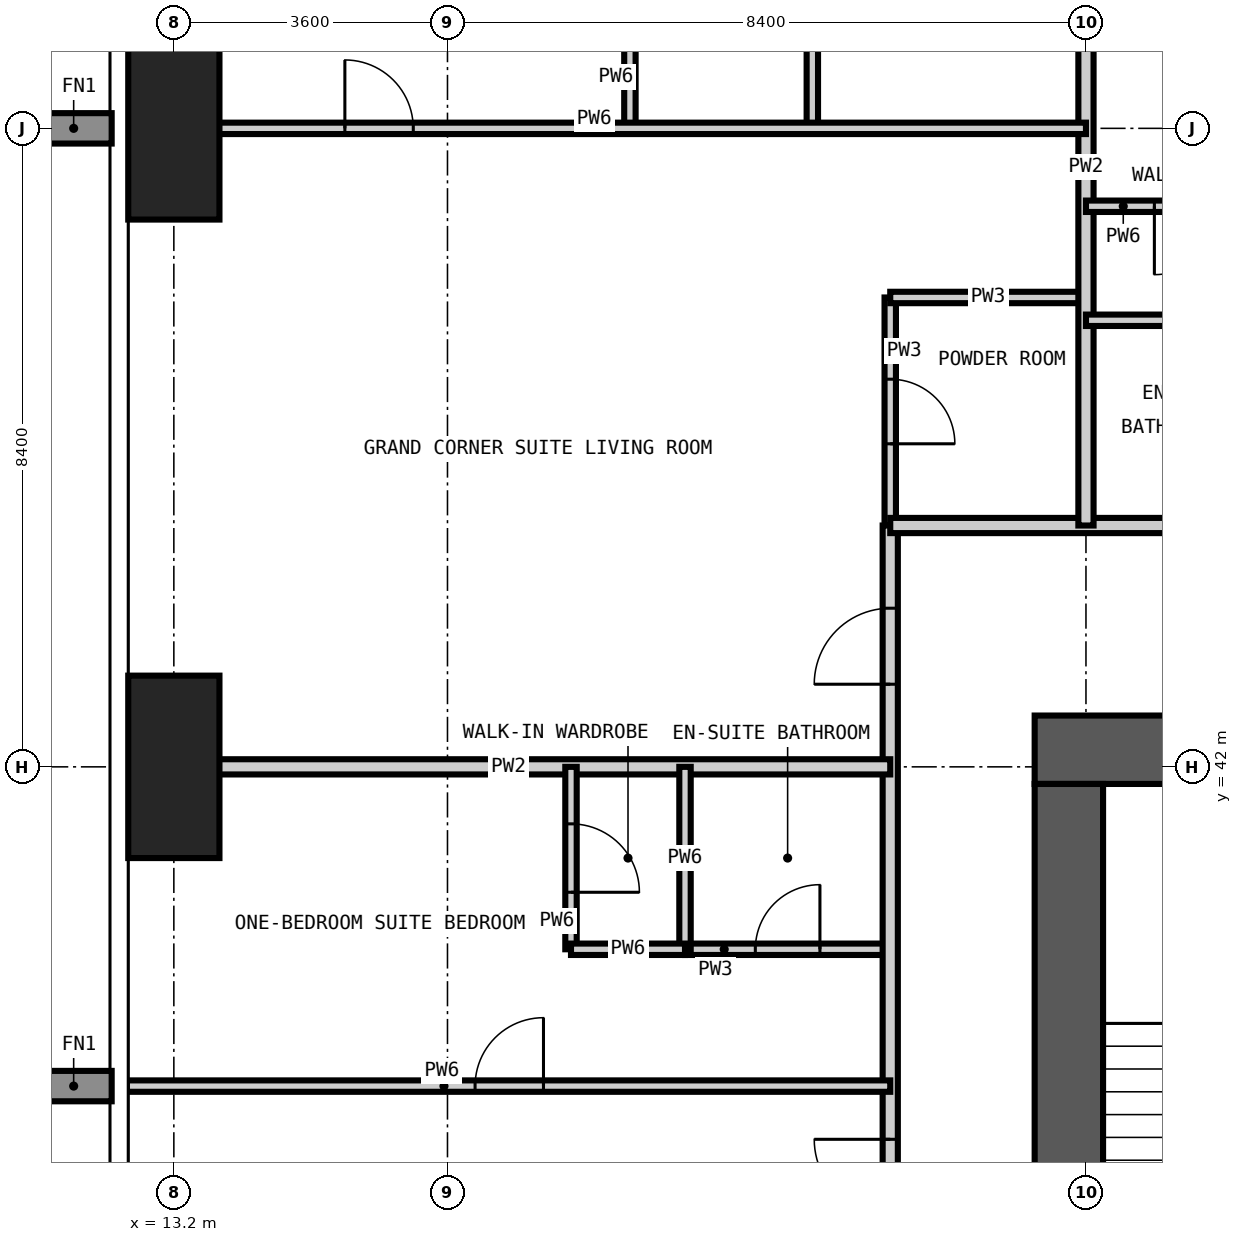
"""IFC4 building model, lengths in metres.
Left out: names, types, materials, properties, quantities, classifications, styles, units other than length and angle.
Written with IfcOpenShell. Run it as: python <this file> out.ifc"""

import sys

from ifc_helpers import new_model, si_unit, direction, frame, frame_2d, origin, origin_2d, place, context, subcontext, project, spatial, rectangle, extrude, element, fill, save


model = new_model("IFC4")
c1 = context("Model", 3, precision=1e-05, world=origin(), true_north=direction((0.0, 1.0)))
c2 = subcontext(c1, "Body", "Model", "MODEL_VIEW")
j1 = project(units=[si_unit("LENGTHUNIT", "METRE"), si_unit("PLANEANGLEUNIT", "RADIAN")], contexts=[c1])
p1 = place(None, origin())
s1 = spatial("IfcSite", under=j1, at=p1, CompositionType="ELEMENT")
p2 = place(p1, origin())
s2 = spatial("IfcBuilding", under=s1, at=p2, CompositionType="ELEMENT")
p3 = place(p2, frame((0.0, 0.0, 233.4)))
s3 = spatial("IfcBuildingStorey", under=s2, at=p3, CompositionType="ELEMENT", Elevation=233.4)
for number, where, z_axis, x_axis in (
    (1, (13.2, 42.0, -0.35), (0.0, 0.0, 1.0), (1.0, 0.0, 0.0)),
    (2, (13.2, 50.4, -0.35), (0.0, 0.0, 1.0), (1.0, 0.0, 0.0)),
):
    element("IfcColumn", number, at=place(p3, frame(where, z_axis=z_axis, x_axis=x_axis)), inside=s3, PredefinedType="COLUMN", context=c2, shape_type="SweptSolid", body=[
        extrude(rectangle(XDim=1.2, YDim=2.4, at=origin_2d()), origin(), (0.0, 0.0, 1.0), 3.9),
    ])
p4 = place(p3, frame((42.675, 42.225, -0.35), z_axis=(0.0, 0.0, 1.0), x_axis=(-1.0, 0.0, 0.0)))
e3 = element("IfcWall", 3, at=p4, inside=s3, PredefinedType="SHEAR", context=c2, shape_type="SweptSolid", body=[
    extrude(rectangle(XDim=18.15, YDim=0.9, at=frame_2d((9.075, 0.0))), origin(), (0.0, 0.0, 1.0), 3.9),
])
p5 = place(p4, frame((10.575, 0.0, 0.35)))
e4 = element("IfcOpeningElement", 4, at=p5, cuts=e3, PredefinedType="OPENING", context=c2, shape_type="SweptSolid", body=[
    extrude(rectangle(XDim=1.2, YDim=2.2, at=frame_2d((0.6, 1.1))), frame((0.0, 0.46, 0.0), z_axis=(0.0, -1.0, 0.0), x_axis=(1.0, 0.0, 0.0)), (0.0, 0.0, 1.0), 0.92),
])
p6 = place(p3, frame((24.975, 41.775, -0.35), z_axis=(0.0, 0.0, 1.0), x_axis=(0.0, -1.0, 0.0)))
e5 = element("IfcWall", 5, at=p6, inside=s3, PredefinedType="SHEAR", context=c2, shape_type="SweptSolid", body=[
    extrude(rectangle(XDim=24.75, YDim=0.9, at=frame_2d((12.375, 0.0))), origin(), (0.0, 0.0, 1.0), 3.9),
])
p7 = place(p6, frame((11.875, 0.0, 0.35)))
e6 = element("IfcOpeningElement", 6, at=p7, cuts=e5, PredefinedType="OPENING", context=c2, shape_type="SweptSolid", body=[
    extrude(rectangle(XDim=1.0, YDim=2.1, at=frame_2d((0.5, 1.05))), frame((0.0, 0.46, 0.0), z_axis=(0.0, -1.0, 0.0), x_axis=(1.0, 0.0, 0.0)), (0.0, 0.0, 1.0), 0.92),
])
p8 = place(p3, frame((22.625, 45.175, 0.0), z_axis=(0.0, 0.0, 1.0), x_axis=(0.0, 1.0, 0.0)))
e7 = element("IfcWall", 7, at=p8, inside=s3, PredefinedType="PARTITIONING", context=c2, shape_type="SweptSolid", body=[
    extrude(rectangle(XDim=3.0, YDim=0.15, at=frame_2d((1.5, 0.0))), origin(), (0.0, 0.0, 1.0), 3.55),
])
p9 = place(p8, frame((1.075, 0.0, 0.0)))
e8 = element("IfcOpeningElement", 8, at=p9, cuts=e7, PredefinedType="OPENING", context=c2, shape_type="SweptSolid", body=[
    extrude(rectangle(XDim=0.85, YDim=2.1, at=frame_2d((0.425, 1.05))), frame((0.0, 0.085, 0.0), z_axis=(0.0, -1.0, 0.0), x_axis=(1.0, 0.0, 0.0)), (0.0, 0.0, 1.0), 0.17),
])
p10 = place(p3, frame((19.925, 39.6, 0.0), z_axis=(0.0, 0.0, 1.0), x_axis=(1.0, 0.0, 0.0)))
e9 = element("IfcWall", 9, at=p10, inside=s3, PredefinedType="PARTITIONING", context=c2, shape_type="SweptSolid", body=[
    extrude(rectangle(XDim=2.7, YDim=0.15, at=frame_2d((1.35, 0.0))), origin(), (0.0, 0.0, 1.0), 3.55),
])
p11 = place(p10, frame((0.925, 0.0, 0.0)))
e10 = element("IfcOpeningElement", 10, at=p11, cuts=e9, PredefinedType="OPENING", context=c2, shape_type="SweptSolid", body=[
    extrude(rectangle(XDim=0.85, YDim=2.1, at=frame_2d((0.425, 1.05))), frame((0.0, 0.085, 0.0), z_axis=(0.0, -1.0, 0.0), x_axis=(1.0, 0.0, 0.0)), (0.0, 0.0, 1.0), 0.17),
])
p12 = place(p3, frame((22.625, 48.175, 0.0), z_axis=(0.0, 0.0, 1.0), x_axis=(1.0, 0.0, 0.0)))
e11 = element("IfcWall", 11, at=p12, inside=s3, PredefinedType="PARTITIONING", context=c2, shape_type="SweptSolid", body=[
    extrude(rectangle(XDim=2.575, YDim=0.15, at=frame_2d((1.288, 0.0))), origin(), (0.0, 0.0, 1.0), 3.55),
])
p13 = place(p3, frame((22.625, 14.225, 0.0), z_axis=(0.0, 0.0, 1.0), x_axis=(0.0, 1.0, 0.0)))
e12 = element("IfcWall", 12, at=p13, inside=s3, PredefinedType="PARTITIONING", context=c2, shape_type="SweptSolid", body=[
    extrude(rectangle(XDim=30.95, YDim=0.2, at=frame_2d((15.475, 0.0))), origin(), (0.0, 0.0, 1.0), 3.55),
])
p14 = place(p13, frame((5.075, 0.0, 0.0)))
e13 = element("IfcOpeningElement", 13, at=p14, cuts=e12, PredefinedType="OPENING", context=c2, shape_type="SweptSolid", body=[
    extrude(rectangle(XDim=1.0, YDim=2.2, at=frame_2d((0.5, 1.1))), frame((0.0, 0.11, 0.0), z_axis=(0.0, -1.0, 0.0), x_axis=(1.0, 0.0, 0.0)), (0.0, 0.0, 1.0), 0.22),
])
p15 = place(p13, frame((13.475, 0.0, 0.0)))
e14 = element("IfcOpeningElement", 14, at=p15, cuts=e12, PredefinedType="OPENING", context=c2, shape_type="SweptSolid", body=[
    extrude(rectangle(XDim=1.0, YDim=2.2, at=frame_2d((0.5, 1.1))), frame((0.0, 0.11, 0.0), z_axis=(0.0, -1.0, 0.0), x_axis=(1.0, 0.0, 0.0)), (0.0, 0.0, 1.0), 0.22),
])
p16 = place(p13, frame((21.875, 0.0, 0.0)))
e15 = element("IfcOpeningElement", 15, at=p16, cuts=e12, PredefinedType="OPENING", context=c2, shape_type="SweptSolid", body=[
    extrude(rectangle(XDim=1.0, YDim=2.2, at=frame_2d((0.5, 1.1))), frame((0.0, 0.11, 0.0), z_axis=(0.0, -1.0, 0.0), x_axis=(1.0, 0.0, 0.0)), (0.0, 0.0, 1.0), 0.22),
])
p17 = place(p13, frame((0.787, 0.0, 0.0)))
e16 = element("IfcOpeningElement", 16, at=p17, cuts=e12, PredefinedType="OPENING", context=c2, shape_type="SweptSolid", body=[
    extrude(rectangle(XDim=1.0, YDim=2.2, at=frame_2d((0.5, 1.1))), frame((0.0, 0.11, 0.0), z_axis=(0.0, -1.0, 0.0), x_axis=(1.0, 0.0, 0.0)), (0.0, 0.0, 1.0), 0.22),
])
p18 = place(p13, frame((28.862, 0.0, 0.0)))
e17 = element("IfcOpeningElement", 17, at=p18, cuts=e12, PredefinedType="OPENING", context=c2, shape_type="SweptSolid", body=[
    extrude(rectangle(XDim=1.0, YDim=2.2, at=frame_2d((0.5, 1.1))), frame((0.0, 0.11, 0.0), z_axis=(0.0, -1.0, 0.0), x_axis=(1.0, 0.0, 0.0)), (0.0, 0.0, 1.0), 0.22),
])
p19 = place(p3, frame((22.625, 45.175, 0.0), z_axis=(0.0, 0.0, 1.0), x_axis=(1.0, 0.0, 0.0)))
e18 = element("IfcWall", 18, at=p19, inside=s3, PredefinedType="PARTITIONING", context=c2, shape_type="SweptSolid", body=[
    extrude(rectangle(XDim=22.25, YDim=0.2, at=frame_2d((11.125, 0.0))), origin(), (0.0, 0.0, 1.0), 3.55),
])
p20 = place(p19, frame((7.625, 0.0, 0.0)))
e19 = element("IfcOpeningElement", 19, at=p20, cuts=e18, PredefinedType="OPENING", context=c2, shape_type="SweptSolid", body=[
    extrude(rectangle(XDim=1.0, YDim=2.2, at=frame_2d((0.5, 1.1))), frame((0.0, 0.11, 0.0), z_axis=(0.0, -1.0, 0.0), x_axis=(1.0, 0.0, 0.0)), (0.0, 0.0, 1.0), 0.22),
])
p21 = place(p19, frame((16.025, 0.0, 0.0)))
e20 = element("IfcOpeningElement", 20, at=p21, cuts=e18, PredefinedType="OPENING", context=c2, shape_type="SweptSolid", body=[
    extrude(rectangle(XDim=1.0, YDim=2.2, at=frame_2d((0.5, 1.1))), frame((0.0, 0.11, 0.0), z_axis=(0.0, -1.0, 0.0), x_axis=(1.0, 0.0, 0.0)), (0.0, 0.0, 1.0), 0.22),
])
p22 = place(p3, frame((25.2, 45.175, 0.0), z_axis=(0.0, 0.0, 1.0), x_axis=(0.0, 1.0, 0.0)))
e21 = element("IfcWall", 21, at=p22, inside=s3, PredefinedType="PARTITIONING", context=c2, shape_type="SweptSolid", body=[
    extrude(rectangle(XDim=9.443, YDim=0.2, at=frame_2d((4.721, 0.0))), origin(), (0.0, 0.0, 1.0), 3.55),
])
p23 = place(p3, frame((12.582, 42.0, 0.0), z_axis=(0.0, 0.0, 1.0), x_axis=(1.0, 0.0, 0.0)))
e22 = element("IfcWall", 22, at=p23, inside=s3, PredefinedType="PARTITIONING", context=c2, shape_type="SweptSolid", body=[
    extrude(rectangle(XDim=10.043, YDim=0.2, at=frame_2d((5.021, 0.0))), origin(), (0.0, 0.0, 1.0), 3.55),
])
p24 = place(p3, frame((18.425, 39.6, 0.0), z_axis=(0.0, 0.0, 1.0), x_axis=(0.0, 1.0, 0.0)))
e23 = element("IfcWall", 23, at=p24, inside=s3, PredefinedType="PARTITIONING", context=c2, shape_type="SweptSolid", body=[
    extrude(rectangle(XDim=2.4, YDim=0.15, at=frame_2d((1.2, 0.0))), origin(), (0.0, 0.0, 1.0), 3.55),
])
p25 = place(p24, frame((0.75, 0.0, 0.0)))
e24 = element("IfcOpeningElement", 24, at=p25, cuts=e23, PredefinedType="OPENING", context=c2, shape_type="SweptSolid", body=[
    extrude(rectangle(XDim=0.9, YDim=2.1, at=frame_2d((0.45, 1.05))), frame((0.0, 0.085, 0.0), z_axis=(0.0, -1.0, 0.0), x_axis=(1.0, 0.0, 0.0)), (0.0, 0.0, 1.0), 0.17),
])
p26 = place(p3, frame((19.2, 50.4, 0.0), z_axis=(0.0, 0.0, 1.0), x_axis=(0.0, 1.0, 0.0)))
e25 = element("IfcWall", 25, at=p26, inside=s3, PredefinedType="PARTITIONING", context=c2, shape_type="SweptSolid", body=[
    extrude(rectangle(XDim=3.0, YDim=0.15, at=frame_2d((1.5, 0.0))), origin(), (0.0, 0.0, 1.0), 3.55),
])
p27 = place(p26, frame((1.05, 0.0, 0.0)))
e26 = element("IfcOpeningElement", 26, at=p27, cuts=e25, PredefinedType="OPENING", context=c2, shape_type="SweptSolid", body=[
    extrude(rectangle(XDim=0.9, YDim=2.1, at=frame_2d((0.45, 1.05))), frame((0.0, 0.085, 0.0), z_axis=(0.0, -1.0, 0.0), x_axis=(1.0, 0.0, 0.0)), (0.0, 0.0, 1.0), 0.17),
])
p28 = place(p3, frame((19.925, 39.6, 0.0), z_axis=(0.0, 0.0, 1.0), x_axis=(0.0, 1.0, 0.0)))
e27 = element("IfcWall", 27, at=p28, inside=s3, PredefinedType="PARTITIONING", context=c2, shape_type="SweptSolid", body=[
    extrude(rectangle(XDim=2.4, YDim=0.15, at=frame_2d((1.2, 0.0))), origin(), (0.0, 0.0, 1.0), 3.55),
])
p29 = place(p3, frame((21.6, 50.4, 0.0), z_axis=(0.0, 0.0, 1.0), x_axis=(0.0, 1.0, 0.0)))
e28 = element("IfcWall", 28, at=p29, inside=s3, PredefinedType="PARTITIONING", context=c2, shape_type="SweptSolid", body=[
    extrude(rectangle(XDim=3.0, YDim=0.15, at=frame_2d((1.5, 0.0))), origin(), (0.0, 0.0, 1.0), 3.55),
])
p30 = place(p3, frame((12.582, 37.8, 0.0), z_axis=(0.0, 0.0, 1.0), x_axis=(1.0, 0.0, 0.0)))
e29 = element("IfcWall", 29, at=p30, inside=s3, PredefinedType="PARTITIONING", context=c2, shape_type="SweptSolid", body=[
    extrude(rectangle(XDim=10.043, YDim=0.15, at=frame_2d((5.021, 0.0))), origin(), (0.0, 0.0, 1.0), 3.55),
])
p31 = place(p30, frame((4.581, 0.0, 0.0)))
e30 = element("IfcOpeningElement", 30, at=p31, cuts=e29, PredefinedType="OPENING", context=c2, shape_type="SweptSolid", body=[
    extrude(rectangle(XDim=0.9, YDim=2.1, at=frame_2d((0.45, 1.05))), frame((0.0, 0.085, 0.0), z_axis=(0.0, -1.0, 0.0), x_axis=(1.0, 0.0, 0.0)), (0.0, 0.0, 1.0), 0.17),
])
p32 = place(p3, frame((18.425, 39.6, 0.0), z_axis=(0.0, 0.0, 1.0), x_axis=(1.0, 0.0, 0.0)))
e31 = element("IfcWall", 31, at=p32, inside=s3, PredefinedType="PARTITIONING", context=c2, shape_type="SweptSolid", body=[
    extrude(rectangle(XDim=1.5, YDim=0.15, at=frame_2d((0.75, 0.0))), origin(), (0.0, 0.0, 1.0), 3.55),
])
p33 = place(p3, frame((25.2, 47.875, 0.0), z_axis=(0.0, 0.0, 1.0), x_axis=(1.0, 0.0, 0.0)))
e32 = element("IfcWall", 32, at=p33, inside=s3, PredefinedType="PARTITIONING", context=c2, shape_type="SweptSolid", body=[
    extrude(rectangle(XDim=2.7, YDim=0.15, at=frame_2d((1.35, 0.0))), origin(), (0.0, 0.0, 1.0), 3.55),
])
p34 = place(p3, frame((25.2, 49.375, 0.0), z_axis=(0.0, 0.0, 1.0), x_axis=(1.0, 0.0, 0.0)))
e33 = element("IfcWall", 33, at=p34, inside=s3, PredefinedType="PARTITIONING", context=c2, shape_type="SweptSolid", body=[
    extrude(rectangle(XDim=2.7, YDim=0.15, at=frame_2d((1.35, 0.0))), origin(), (0.0, 0.0, 1.0), 3.55),
])
p35 = place(p34, frame((0.9, 0.0, 0.0)))
e34 = element("IfcOpeningElement", 34, at=p35, cuts=e33, PredefinedType="OPENING", context=c2, shape_type="SweptSolid", body=[
    extrude(rectangle(XDim=0.9, YDim=2.1, at=frame_2d((0.45, 1.05))), frame((0.0, 0.085, 0.0), z_axis=(0.0, -1.0, 0.0), x_axis=(1.0, 0.0, 0.0)), (0.0, 0.0, 1.0), 0.17),
])
p36 = place(p3, frame((12.582, 50.4, 0.0), z_axis=(0.0, 0.0, 1.0), x_axis=(1.0, 0.0, 0.0)))
e35 = element("IfcWall", 35, at=p36, inside=s3, PredefinedType="PARTITIONING", context=c2, shape_type="SweptSolid", body=[
    extrude(rectangle(XDim=12.618, YDim=0.15, at=frame_2d((6.309, 0.0))), origin(), (0.0, 0.0, 1.0), 3.55),
])
p37 = place(p36, frame((2.868, 0.0, 0.0)))
e36 = element("IfcOpeningElement", 36, at=p37, cuts=e35, PredefinedType="OPENING", context=c2, shape_type="SweptSolid", body=[
    extrude(rectangle(XDim=0.9, YDim=2.1, at=frame_2d((0.45, 1.05))), frame((0.0, 0.085, 0.0), z_axis=(0.0, -1.0, 0.0), x_axis=(1.0, 0.0, 0.0)), (0.0, 0.0, 1.0), 0.17),
])
p38 = place(p35, frame((0.9, 0.0, 0.0), z_axis=(0.0, 0.0, 1.0), x_axis=(-1.0, 0.0, 0.0)))
e37 = element("IfcDoor", 37, at=p38, inside=s3, OperationType="SINGLE_SWING_RIGHT", PredefinedType="DOOR", context=c2, shape_type="SweptSolid", body=[
    extrude(rectangle(XDim=0.9, YDim=2.1, at=frame_2d((0.45, 1.05))), frame((0.0, 0.025, 0.0), z_axis=(0.0, -1.0, 0.0), x_axis=(1.0, 0.0, 0.0)), (0.0, 0.0, 1.0), 0.05),
])
fill(e34, e37)
p39 = place(p16, origin())
e38 = element("IfcDoor", 38, at=p39, inside=s3, OperationType="SINGLE_SWING_RIGHT", PredefinedType="DOOR", context=c2, shape_type="SweptSolid", body=[
    extrude(rectangle(XDim=1.0, YDim=2.2, at=frame_2d((0.5, 1.1))), frame((0.0, 0.025, 0.0), z_axis=(0.0, -1.0, 0.0), x_axis=(1.0, 0.0, 0.0)), (0.0, 0.0, 1.0), 0.05),
])
fill(e15, e38)
p40 = place(p31, origin())
e39 = element("IfcDoor", 39, at=p40, inside=s3, OperationType="SINGLE_SWING_RIGHT", PredefinedType="DOOR", context=c2, shape_type="SweptSolid", body=[
    extrude(rectangle(XDim=0.9, YDim=2.1, at=frame_2d((0.45, 1.05))), frame((0.0, 0.025, 0.0), z_axis=(0.0, -1.0, 0.0), x_axis=(1.0, 0.0, 0.0)), (0.0, 0.0, 1.0), 0.05),
])
fill(e30, e39)
p41 = place(p11, origin())
e40 = element("IfcDoor", 40, at=p41, inside=s3, OperationType="SINGLE_SWING_RIGHT", PredefinedType="DOOR", context=c2, shape_type="SweptSolid", body=[
    extrude(rectangle(XDim=0.85, YDim=2.1, at=frame_2d((0.425, 1.05))), frame((0.0, 0.025, 0.0), z_axis=(0.0, -1.0, 0.0), x_axis=(1.0, 0.0, 0.0)), (0.0, 0.0, 1.0), 0.05),
])
fill(e10, e40)
p42 = place(p25, frame((0.9, 0.0, 0.0), z_axis=(0.0, 0.0, 1.0), x_axis=(-1.0, 0.0, 0.0)))
e41 = element("IfcDoor", 41, at=p42, inside=s3, OperationType="SINGLE_SWING_RIGHT", PredefinedType="DOOR", context=c2, shape_type="SweptSolid", body=[
    extrude(rectangle(XDim=0.9, YDim=2.1, at=frame_2d((0.45, 1.05))), frame((0.0, 0.025, 0.0), z_axis=(0.0, -1.0, 0.0), x_axis=(1.0, 0.0, 0.0)), (0.0, 0.0, 1.0), 0.05),
])
fill(e24, e41)
p43 = place(p18, origin())
e42 = element("IfcDoor", 42, at=p43, inside=s3, OperationType="SINGLE_SWING_LEFT", PredefinedType="DOOR", context=c2, shape_type="SweptSolid", body=[
    extrude(rectangle(XDim=1.0, YDim=2.2, at=frame_2d((0.5, 1.1))), frame((0.0, 0.025, 0.0), z_axis=(0.0, -1.0, 0.0), x_axis=(1.0, 0.0, 0.0)), (0.0, 0.0, 1.0), 0.05),
])
fill(e17, e42)
p44 = place(p9, frame((0.85, 0.0, 0.0), z_axis=(0.0, 0.0, 1.0), x_axis=(-1.0, 0.0, 0.0)))
e43 = element("IfcDoor", 43, at=p44, inside=s3, OperationType="SINGLE_SWING_RIGHT", PredefinedType="DOOR", context=c2, shape_type="SweptSolid", body=[
    extrude(rectangle(XDim=0.85, YDim=2.1, at=frame_2d((0.425, 1.05))), frame((0.0, 0.025, 0.0), z_axis=(0.0, -1.0, 0.0), x_axis=(1.0, 0.0, 0.0)), (0.0, 0.0, 1.0), 0.05),
])
fill(e8, e43)
p45 = place(p37, origin())
e44 = element("IfcDoor", 44, at=p45, inside=s3, OperationType="SINGLE_SWING_LEFT", PredefinedType="DOOR", context=c2, shape_type="SweptSolid", body=[
    extrude(rectangle(XDim=0.9, YDim=2.1, at=frame_2d((0.45, 1.05))), frame((0.0, 0.025, 0.0), z_axis=(0.0, -1.0, 0.0), x_axis=(1.0, 0.0, 0.0)), (0.0, 0.0, 1.0), 0.05),
])
fill(e36, e44)
save(model, sys.argv[1])
